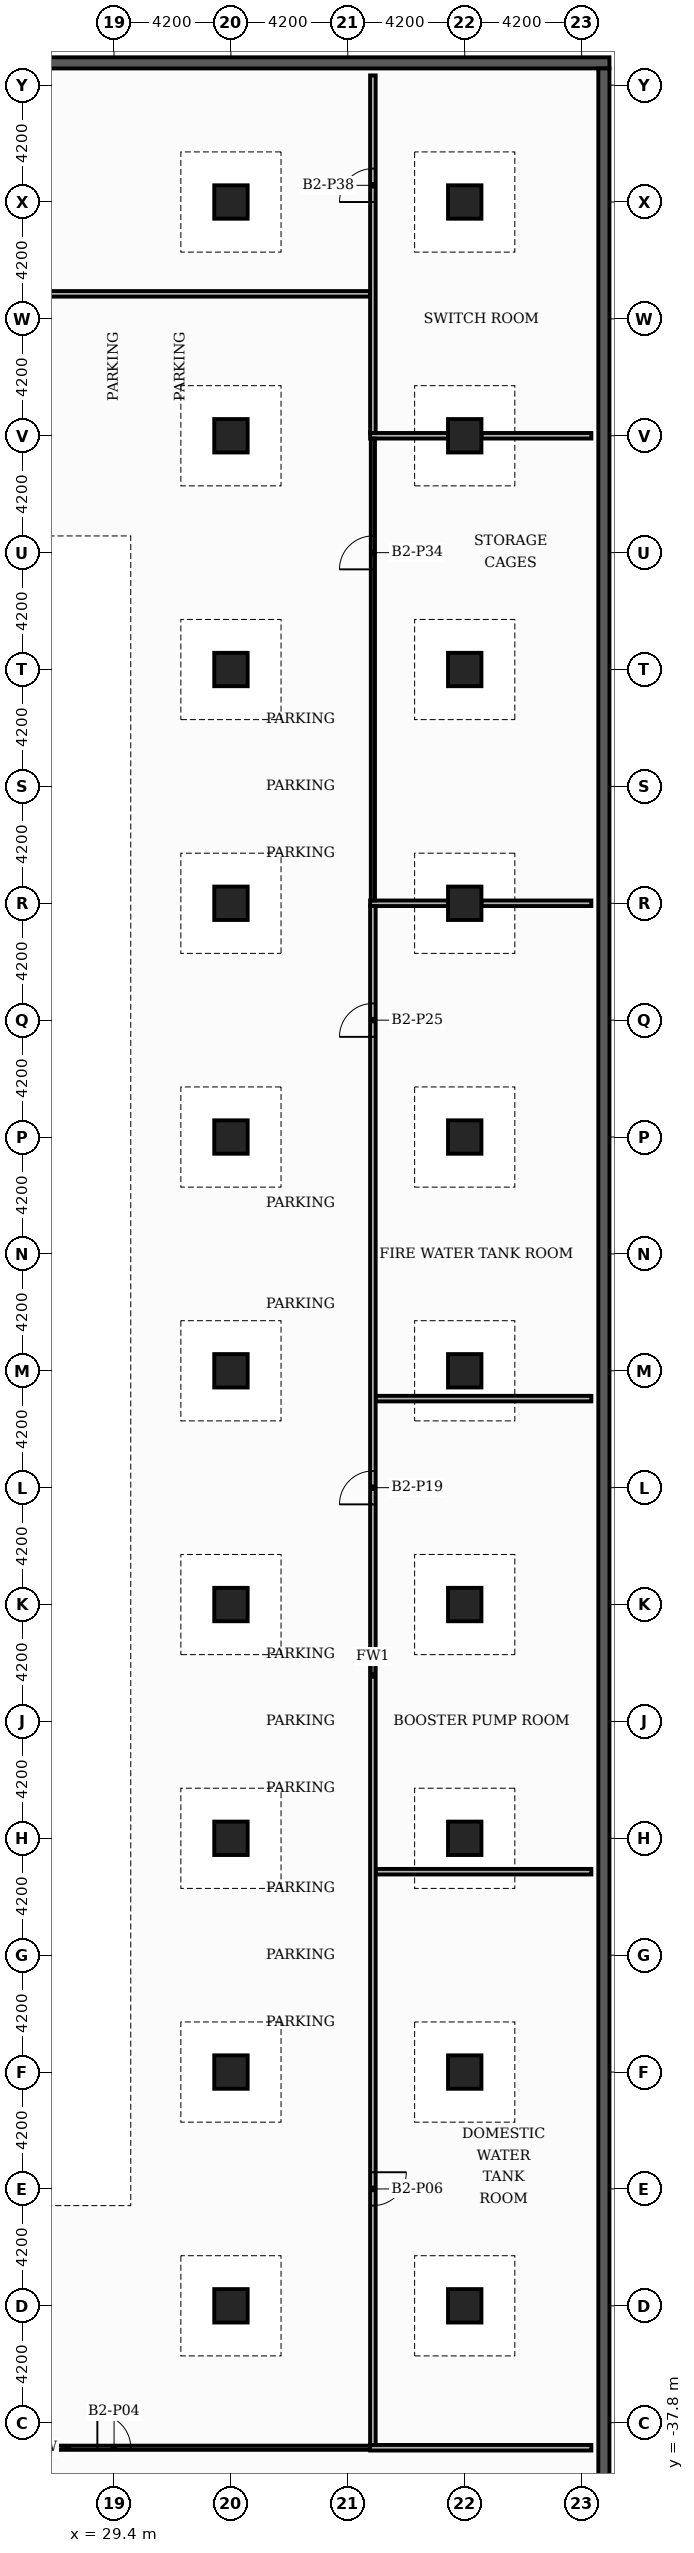
"""IFC4 building model, lengths in metres.
Left out: names, types, materials, properties, quantities, classifications, styles, units other than length and angle.
Written with IfcOpenShell. Run it as: python <this file> out.ifc"""

import sys

from ifc_helpers import new_model, si_unit, direction, frame, frame_2d, origin, origin_2d, place, context, subcontext, project, spatial, rectangle, extrude, element, fill, save


model = new_model("IFC4")
c1 = context("Model", 3, precision=1e-05, world=origin(), true_north=direction((0.0, 1.0)))
c2 = subcontext(c1, "Body", "Model", "MODEL_VIEW")
j1 = project(units=[si_unit("LENGTHUNIT", "METRE"), si_unit("PLANEANGLEUNIT", "RADIAN")], contexts=[c1])
p1 = place(None, origin())
s1 = spatial("IfcSite", under=j1, at=p1, CompositionType="ELEMENT")
p2 = place(p1, origin())
s2 = spatial("IfcBuilding", under=s1, at=p2, CompositionType="ELEMENT")
p3 = place(p2, frame((0.0, 0.0, -8.4)))
s3 = spatial("IfcBuildingStorey", under=s2, at=p3, CompositionType="ELEMENT", Elevation=-8.4)
p4 = place(p3, frame((-47.2, 47.0, -0.4), z_axis=(0.0, 0.0, 1.0), x_axis=(1.0, 0.0, 0.0)))
e1 = element("IfcWall", 1, at=p4, inside=s3, PredefinedType="USERDEFINED", context=c2, shape_type="SweptSolid", body=[
    extrude(rectangle(XDim=94.4, YDim=0.4, at=frame_2d((47.2, 0.0))), origin(), (0.0, 0.0, 1.0), 4.6),
])
p5 = place(p3, frame((47.0, -46.8, -0.4), z_axis=(0.0, 0.0, 1.0), x_axis=(0.0, 1.0, 0.0)))
e2 = element("IfcWall", 2, at=p5, inside=s3, PredefinedType="USERDEFINED", context=c2, shape_type="SweptSolid", body=[
    extrude(rectangle(XDim=93.6, YDim=0.4, at=frame_2d((46.8, 0.0))), origin(), (0.0, 0.0, 1.0), 4.6),
])
for number, where, z_axis, x_axis in (
    (3, (33.6, 0.0, 0.0), (0.0, 0.0, 1.0), (1.0, 0.0, 0.0)),
    (4, (33.6, 8.4, 0.0), (0.0, 0.0, 1.0), (1.0, 0.0, 0.0)),
    (5, (33.6, 16.8, 0.0), (0.0, 0.0, 1.0), (1.0, 0.0, 0.0)),
    (6, (33.6, 25.2, 0.0), (0.0, 0.0, 1.0), (1.0, 0.0, 0.0)),
    (7, (33.6, 33.6, 0.0), (0.0, 0.0, 1.0), (1.0, 0.0, 0.0)),
    (8, (33.6, 42.0, 0.0), (0.0, 0.0, 1.0), (1.0, 0.0, 0.0)),
    (9, (33.6, -8.4, 0.0), (0.0, 0.0, 1.0), (1.0, 0.0, 0.0)),
    (10, (33.6, -16.8, 0.0), (0.0, 0.0, 1.0), (1.0, 0.0, 0.0)),
    (11, (33.6, -25.2, 0.0), (0.0, 0.0, 1.0), (1.0, 0.0, 0.0)),
    (12, (33.6, -33.6, 0.0), (0.0, 0.0, 1.0), (1.0, 0.0, 0.0)),
    (13, (42.0, 0.0, 0.0), (0.0, 0.0, 1.0), (1.0, 0.0, 0.0)),
    (14, (42.0, 8.4, 0.0), (0.0, 0.0, 1.0), (1.0, 0.0, 0.0)),
    (15, (42.0, 16.8, 0.0), (0.0, 0.0, 1.0), (1.0, 0.0, 0.0)),
    (16, (42.0, 25.2, 0.0), (0.0, 0.0, 1.0), (1.0, 0.0, 0.0)),
    (17, (42.0, 33.6, 0.0), (0.0, 0.0, 1.0), (1.0, 0.0, 0.0)),
    (18, (42.0, 42.0, 0.0), (0.0, 0.0, 1.0), (1.0, 0.0, 0.0)),
    (19, (42.0, -8.4, 0.0), (0.0, 0.0, 1.0), (1.0, 0.0, 0.0)),
    (20, (42.0, -16.8, 0.0), (0.0, 0.0, 1.0), (1.0, 0.0, 0.0)),
    (21, (42.0, -25.2, 0.0), (0.0, 0.0, 1.0), (1.0, 0.0, 0.0)),
    (22, (42.0, -33.6, 0.0), (0.0, 0.0, 1.0), (1.0, 0.0, 0.0)),
):
    element("IfcColumn", number, at=place(p3, frame(where, z_axis=z_axis, x_axis=x_axis)), inside=s3, PredefinedType="COLUMN", context=c2, shape_type="SweptSolid", body=[
        extrude(rectangle(XDim=1.2, YDim=1.2, at=origin_2d()), origin(), (0.0, 0.0, 1.0), 4.2),
    ])
p6 = place(p3, frame((16.7, -38.7, 0.0), z_axis=(0.0, 0.0, 1.0), x_axis=(1.0, 0.0, 0.0)))
e23 = element("IfcWall", 23, at=p6, inside=s3, PredefinedType="PARTITIONING", context=c2, shape_type="SweptSolid", body=[
    extrude(rectangle(XDim=22.1, YDim=0.15, at=frame_2d((11.05, 0.0))), origin(), (0.0, 0.0, 1.0), 3.85),
])
p7 = place(p6, frame((12.1, 0.0, 0.0)))
e24 = element("IfcOpeningElement", 24, at=p7, cuts=e23, PredefinedType="OPENING", context=c2, shape_type="SweptSolid", body=[
    extrude(rectangle(XDim=1.2, YDim=2.2, at=frame_2d((0.6, 1.1))), frame((0.0, 0.085, 0.0), z_axis=(0.0, -1.0, 0.0), x_axis=(1.0, 0.0, 0.0)), (0.0, 0.0, 1.0), 0.17),
])
p8 = place(p3, frame((38.6, -38.7, 0.0), z_axis=(0.0, 0.0, 1.0), x_axis=(1.0, 0.0, 0.0)))
e25 = element("IfcWall", 25, at=p8, inside=s3, PredefinedType="PARTITIONING", context=c2, shape_type="SweptSolid", body=[
    extrude(rectangle(XDim=7.95, YDim=0.2, at=frame_2d((3.975, 0.0))), origin(), (0.0, 0.0, 1.0), 3.85),
])
for number, where, z_axis, x_axis in (
    (26, (38.8, -18.0, 0.0), (0.0, 0.0, 1.0), (1.0, 0.0, 0.0)),
    (27, (38.8, -1.0, 0.0), (0.0, 0.0, 1.0), (1.0, 0.0, 0.0)),
):
    element("IfcWall", number, at=place(p3, frame(where, z_axis=z_axis, x_axis=x_axis)), inside=s3, PredefinedType="PARTITIONING", context=c2, shape_type="SweptSolid", body=[
        extrude(rectangle(XDim=7.75, YDim=0.2, at=frame_2d((3.875, 0.0))), origin(), (0.0, 0.0, 1.0), 3.85),
    ])
p9 = place(p3, frame((38.6, 16.8, 0.0), z_axis=(0.0, 0.0, 1.0), x_axis=(1.0, 0.0, 0.0)))
e28 = element("IfcWall", 28, at=p9, inside=s3, PredefinedType="PARTITIONING", context=c2, shape_type="SweptSolid", body=[
    extrude(rectangle(XDim=2.8, YDim=0.2, at=frame_2d((1.4, 0.0))), origin(), (0.0, 0.0, 1.0), 3.85),
])
p10 = place(p3, frame((42.6, 16.8, 0.0), z_axis=(0.0, 0.0, 1.0), x_axis=(1.0, 0.0, 0.0)))
e29 = element("IfcWall", 29, at=p10, inside=s3, PredefinedType="PARTITIONING", context=c2, shape_type="SweptSolid", body=[
    extrude(rectangle(XDim=3.95, YDim=0.2, at=frame_2d((1.975, 0.0))), origin(), (0.0, 0.0, 1.0), 3.85),
])
p11 = place(p3, frame((38.6, 33.6, 0.0), z_axis=(0.0, 0.0, 1.0), x_axis=(1.0, 0.0, 0.0)))
e30 = element("IfcWall", 30, at=p11, inside=s3, PredefinedType="PARTITIONING", context=c2, shape_type="SweptSolid", body=[
    extrude(rectangle(XDim=2.8, YDim=0.2, at=frame_2d((1.4, 0.0))), origin(), (0.0, 0.0, 1.0), 3.85),
])
p12 = place(p3, frame((42.6, 33.6, 0.0), z_axis=(0.0, 0.0, 1.0), x_axis=(1.0, 0.0, 0.0)))
e31 = element("IfcWall", 31, at=p12, inside=s3, PredefinedType="PARTITIONING", context=c2, shape_type="SweptSolid", body=[
    extrude(rectangle(XDim=3.95, YDim=0.2, at=frame_2d((1.975, 0.0))), origin(), (0.0, 0.0, 1.0), 3.85),
])
p13 = place(p3, frame((0.85, 38.7, 0.0), z_axis=(0.0, 0.0, 1.0), x_axis=(1.0, 0.0, 0.0)))
e32 = element("IfcWall", 32, at=p13, inside=s3, PredefinedType="PARTITIONING", context=c2, shape_type="SweptSolid", body=[
    extrude(rectangle(XDim=37.75, YDim=0.2, at=frame_2d((18.875, 0.0))), origin(), (0.0, 0.0, 1.0), 3.85),
])
p14 = place(p13, frame((3.25, 0.0, 0.0)))
e33 = element("IfcOpeningElement", 33, at=p14, cuts=e32, PredefinedType="OPENING", context=c2, shape_type="SweptSolid", body=[
    extrude(rectangle(XDim=1.2, YDim=2.2, at=frame_2d((0.6, 1.1))), frame((0.0, 0.11, 0.0), z_axis=(0.0, -1.0, 0.0), x_axis=(1.0, 0.0, 0.0)), (0.0, 0.0, 1.0), 0.22),
])
p15 = place(p3, frame((38.7, -38.6, 0.0), z_axis=(0.0, 0.0, 1.0), x_axis=(0.0, 1.0, 0.0)))
e34 = element("IfcWall", 34, at=p15, inside=s3, PredefinedType="PARTITIONING", context=c2, shape_type="SweptSolid", body=[
    extrude(rectangle(XDim=55.3, YDim=0.2, at=frame_2d((27.65, 0.0))), origin(), (0.0, 0.0, 1.0), 3.85),
])
p16 = place(p15, frame((8.6, 0.0, 0.0)))
e35 = element("IfcOpeningElement", 35, at=p16, cuts=e34, PredefinedType="OPENING", context=c2, shape_type="SweptSolid", body=[
    extrude(rectangle(XDim=1.2, YDim=2.2, at=frame_2d((0.6, 1.1))), frame((0.0, 0.11, 0.0), z_axis=(0.0, -1.0, 0.0), x_axis=(1.0, 0.0, 0.0)), (0.0, 0.0, 1.0), 0.22),
])
p17 = place(p15, frame((33.8, 0.0, 0.0)))
e36 = element("IfcOpeningElement", 36, at=p17, cuts=e34, PredefinedType="OPENING", context=c2, shape_type="SweptSolid", body=[
    extrude(rectangle(XDim=1.2, YDim=2.2, at=frame_2d((0.6, 1.1))), frame((0.0, 0.11, 0.0), z_axis=(0.0, -1.0, 0.0), x_axis=(1.0, 0.0, 0.0)), (0.0, 0.0, 1.0), 0.22),
])
p18 = place(p15, frame((50.6, 0.0, 0.0)))
e37 = element("IfcOpeningElement", 37, at=p18, cuts=e34, PredefinedType="OPENING", context=c2, shape_type="SweptSolid", body=[
    extrude(rectangle(XDim=1.2, YDim=2.2, at=frame_2d((0.6, 1.1))), frame((0.0, 0.11, 0.0), z_axis=(0.0, -1.0, 0.0), x_axis=(1.0, 0.0, 0.0)), (0.0, 0.0, 1.0), 0.22),
])
p19 = place(p3, frame((38.7, 16.9, 0.0), z_axis=(0.0, 0.0, 1.0), x_axis=(0.0, 1.0, 0.0)))
e38 = element("IfcWall", 38, at=p19, inside=s3, PredefinedType="PARTITIONING", context=c2, shape_type="SweptSolid", body=[
    extrude(rectangle(XDim=16.6, YDim=0.15, at=frame_2d((8.3, 0.0))), origin(), (0.0, 0.0, 1.0), 3.85),
])
p20 = place(p19, frame((11.9, 0.0, 0.0)))
e39 = element("IfcOpeningElement", 39, at=p20, cuts=e38, PredefinedType="OPENING", context=c2, shape_type="SweptSolid", body=[
    extrude(rectangle(XDim=1.2, YDim=2.2, at=frame_2d((0.6, 1.1))), frame((0.0, 0.085, 0.0), z_axis=(0.0, -1.0, 0.0), x_axis=(1.0, 0.0, 0.0)), (0.0, 0.0, 1.0), 0.17),
])
p21 = place(p3, frame((38.7, 33.7, 0.0), z_axis=(0.0, 0.0, 1.0), x_axis=(0.0, 1.0, 0.0)))
e40 = element("IfcWall", 40, at=p21, inside=s3, PredefinedType="PARTITIONING", context=c2, shape_type="SweptSolid", body=[
    extrude(rectangle(XDim=12.85, YDim=0.2, at=frame_2d((6.425, 0.0))), origin(), (0.0, 0.0, 1.0), 3.85),
])
p22 = place(p21, frame((8.3, 0.0, 0.0)))
e41 = element("IfcOpeningElement", 41, at=p22, cuts=e40, PredefinedType="OPENING", context=c2, shape_type="SweptSolid", body=[
    extrude(rectangle(XDim=1.2, YDim=2.2, at=frame_2d((0.6, 1.1))), frame((0.0, 0.11, 0.0), z_axis=(0.0, -1.0, 0.0), x_axis=(1.0, 0.0, 0.0)), (0.0, 0.0, 1.0), 0.22),
])
p23 = place(p7, origin())
e42 = element("IfcDoor", 42, at=p23, inside=s3, OperationType="SINGLE_SWING_LEFT", PredefinedType="DOOR", context=c2, shape_type="SweptSolid", body=[
    extrude(rectangle(XDim=1.2, YDim=2.2, at=frame_2d((0.6, 1.1))), frame((0.0, 0.025, 0.0), z_axis=(0.0, -1.0, 0.0), x_axis=(1.0, 0.0, 0.0)), (0.0, 0.0, 1.0), 0.05),
])
fill(e24, e42)
p24 = place(p16, origin())
e43 = element("IfcDoor", 43, at=p24, inside=s3, OperationType="SINGLE_SWING_RIGHT", PredefinedType="DOOR", context=c2, shape_type="SweptSolid", body=[
    extrude(rectangle(XDim=1.2, YDim=2.2, at=frame_2d((0.6, 1.1))), frame((0.0, 0.025, 0.0), z_axis=(0.0, -1.0, 0.0), x_axis=(1.0, 0.0, 0.0)), (0.0, 0.0, 1.0), 0.05),
])
fill(e35, e43)
p25 = place(p17, origin())
e44 = element("IfcDoor", 44, at=p25, inside=s3, OperationType="SINGLE_SWING_LEFT", PredefinedType="DOOR", context=c2, shape_type="SweptSolid", body=[
    extrude(rectangle(XDim=1.2, YDim=2.2, at=frame_2d((0.6, 1.1))), frame((0.0, 0.025, 0.0), z_axis=(0.0, -1.0, 0.0), x_axis=(1.0, 0.0, 0.0)), (0.0, 0.0, 1.0), 0.05),
])
fill(e36, e44)
p26 = place(p18, origin())
e45 = element("IfcDoor", 45, at=p26, inside=s3, OperationType="SINGLE_SWING_LEFT", PredefinedType="DOOR", context=c2, shape_type="SweptSolid", body=[
    extrude(rectangle(XDim=1.2, YDim=2.2, at=frame_2d((0.6, 1.1))), frame((0.0, 0.025, 0.0), z_axis=(0.0, -1.0, 0.0), x_axis=(1.0, 0.0, 0.0)), (0.0, 0.0, 1.0), 0.05),
])
fill(e37, e45)
p27 = place(p20, origin())
e46 = element("IfcDoor", 46, at=p27, inside=s3, OperationType="SINGLE_SWING_LEFT", PredefinedType="DOOR", context=c2, shape_type="SweptSolid", body=[
    extrude(rectangle(XDim=1.2, YDim=2.2, at=frame_2d((0.6, 1.1))), frame((0.0, 0.025, 0.0), z_axis=(0.0, -1.0, 0.0), x_axis=(1.0, 0.0, 0.0)), (0.0, 0.0, 1.0), 0.05),
])
fill(e39, e46)
p28 = place(p22, origin())
e47 = element("IfcDoor", 47, at=p28, inside=s3, OperationType="SINGLE_SWING_LEFT", PredefinedType="DOOR", context=c2, shape_type="SweptSolid", body=[
    extrude(rectangle(XDim=1.2, YDim=2.2, at=frame_2d((0.6, 1.1))), frame((0.0, 0.025, 0.0), z_axis=(0.0, -1.0, 0.0), x_axis=(1.0, 0.0, 0.0)), (0.0, 0.0, 1.0), 0.05),
])
fill(e41, e47)
save(model, sys.argv[1])
